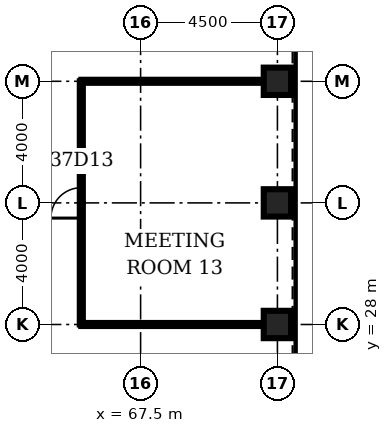
"""IFC4 building model, lengths in metres.
Left out: names, types, materials, properties, quantities, classifications, styles, units other than length and angle.
Written with IfcOpenShell. Run it as: python <this file> out.ifc"""

import sys

from ifc_helpers import new_model, si_unit, direction, frame, frame_2d, origin, origin_2d, place, context, subcontext, project, spatial, rectangle, hollow_rectangle, extrude, element, fill, save


model = new_model("IFC4")
c1 = context("Model", 3, precision=1e-05, world=origin(), true_north=direction((0.0, 1.0)))
c2 = subcontext(c1, "Body", "Model", "MODEL_VIEW")
j1 = project(units=[si_unit("LENGTHUNIT", "METRE"), si_unit("PLANEANGLEUNIT", "RADIAN")], contexts=[c1])
p1 = place(None, origin())
s1 = spatial("IfcSite", under=j1, at=p1, CompositionType="ELEMENT")
p2 = place(p1, origin())
s2 = spatial("IfcBuilding", under=s1, at=p2, CompositionType="ELEMENT")
p3 = place(p2, frame((0.0, 0.0, 167.7)))
s3 = spatial("IfcBuildingStorey", under=s2, at=p3, CompositionType="ELEMENT", Elevation=167.7)
for number, where, z_axis, x_axis in (
    (1, (72.0, 28.0, 0.0), (0.0, 0.0, 1.0), (1.0, 0.0, 0.0)),
    (2, (72.0, 32.0, 0.0), (0.0, 0.0, 1.0), (1.0, 0.0, 0.0)),
    (3, (72.0, 36.0, 0.0), (0.0, 0.0, 1.0), (1.0, 0.0, 0.0)),
):
    element("IfcColumn", number, at=place(p3, frame(where, z_axis=z_axis, x_axis=x_axis)), inside=s3, PredefinedType="COLUMN", context=c2, shape_type="SweptSolid", body=[
        extrude(hollow_rectangle(XDim=0.9, YDim=0.9, WallThickness=0.09, at=origin_2d()), origin(), (0.0, 0.0, 1.0), 4.2),
    ])
for number, where, z_axis, x_axis in (
    (4, (65.55, 28.0, 0.0), (0.0, 0.0, 1.0), (1.0, 0.0, 0.0)),
    (5, (65.55, 36.0, 0.0), (0.0, 0.0, 1.0), (1.0, 0.0, 0.0)),
):
    element("IfcWall", number, at=place(p3, frame(where, z_axis=z_axis, x_axis=x_axis)), inside=s3, PredefinedType="PARTITIONING", context=c2, shape_type="SweptSolid", body=[
        extrude(rectangle(XDim=6.0, YDim=0.1, at=frame_2d((3.0, 0.0))), origin(), (0.0, 0.0, 1.0), 3.0),
    ])
p4 = place(p3, frame((65.55, 28.0, 0.0), z_axis=(0.0, 0.0, 1.0), x_axis=(0.0, 1.0, 0.0)))
e6 = element("IfcWall", 6, at=p4, inside=s3, PredefinedType="PARTITIONING", context=c2, shape_type="SweptSolid", body=[
    extrude(rectangle(XDim=8.0, YDim=0.1, at=frame_2d((4.0, 0.0))), origin(), (0.0, 0.0, 1.0), 3.0),
])
p5 = place(p4, frame((3.5, 0.0, 0.0)))
e7 = element("IfcOpeningElement", 7, at=p5, cuts=e6, PredefinedType="OPENING", context=c2, shape_type="SweptSolid", body=[
    extrude(rectangle(XDim=1.0, YDim=2.1, at=frame_2d((0.5, 1.05))), frame((0.0, 0.06, 0.0), z_axis=(0.0, -1.0, 0.0), x_axis=(1.0, 0.0, 0.0)), (0.0, 0.0, 1.0), 0.12),
])
p6 = place(p5, origin())
e8 = element("IfcDoor", 8, at=p6, inside=s3, OperationType="SINGLE_SWING_LEFT", PredefinedType="DOOR", context=c2, shape_type="SweptSolid", body=[
    extrude(rectangle(XDim=1.0, YDim=2.1, at=frame_2d((0.5, 1.05))), frame((0.0, 0.025, 0.0), z_axis=(0.0, -1.0, 0.0), x_axis=(1.0, 0.0, 0.0)), (0.0, 0.0, 1.0), 0.05),
])
fill(e7, e8)
save(model, sys.argv[1])
